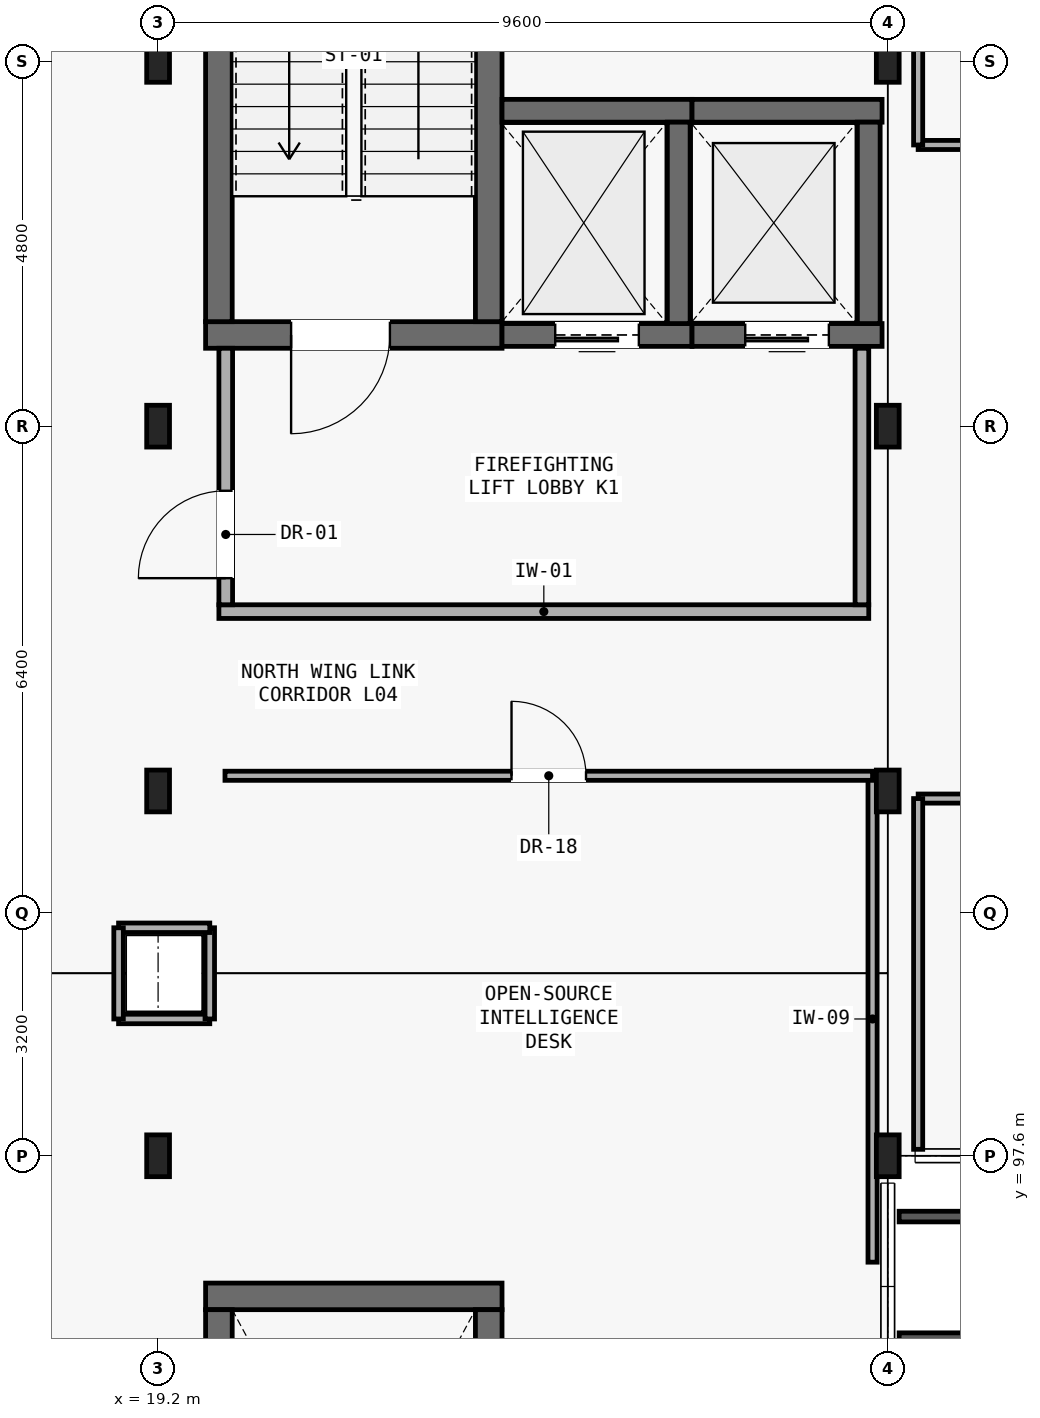
"""IFC4 building model, lengths in metres.
Left out: names, types, materials, properties, quantities, classifications, styles, units other than length and angle.
Written with IfcOpenShell. Run it as: python <this file> out.ifc"""

import sys

from ifc_helpers import new_model, si_unit, direction, frame, frame_2d, origin, origin_2d, place, context, subcontext, project, spatial, rectangle, i_section, extrude, element, fill, save


model = new_model("IFC4")
c1 = context("Model", 3, precision=1e-05, world=origin(), true_north=direction((0.0, 1.0)))
c2 = subcontext(c1, "Body", "Model", "MODEL_VIEW")
j1 = project(units=[si_unit("LENGTHUNIT", "METRE"), si_unit("PLANEANGLEUNIT", "RADIAN")], contexts=[c1])
p1 = place(None, origin())
s1 = spatial("IfcSite", under=j1, at=p1, CompositionType="ELEMENT")
p2 = place(p1, origin())
s2 = spatial("IfcBuilding", under=s1, at=p2, CompositionType="ELEMENT")
p3 = place(p2, frame((0.0, 0.0, 17.85)))
s3 = spatial("IfcBuildingStorey", under=s2, at=p3, CompositionType="ELEMENT", Elevation=17.85)
for number, where, z_axis, x_axis in (
    (1, (28.8, 97.6, 0.0), (0.0, 0.0, 1.0), (1.0, 0.0, 0.0)),
    (2, (28.8, 102.4, 0.0), (0.0, 0.0, 1.0), (1.0, 0.0, 0.0)),
    (3, (28.8, 107.2, 0.0), (0.0, 0.0, 1.0), (1.0, 0.0, 0.0)),
    (4, (28.8, 112.0, 0.0), (0.0, 0.0, 1.0), (1.0, 0.0, 0.0)),
    (5, (19.2, 97.6, 0.0), (0.0, 0.0, 1.0), (1.0, 0.0, 0.0)),
    (6, (19.2, 102.4, 0.0), (0.0, 0.0, 1.0), (1.0, 0.0, 0.0)),
    (7, (19.2, 107.2, 0.0), (0.0, 0.0, 1.0), (1.0, 0.0, 0.0)),
    (8, (19.2, 112.0, 0.0), (0.0, 0.0, 1.0), (1.0, 0.0, 0.0)),
):
    element("IfcColumn", number, at=place(p3, frame(where, z_axis=z_axis, x_axis=x_axis)), inside=s3, PredefinedType="COLUMN", context=c2, shape_type="SweptSolid", body=[
        extrude(i_section(OverallWidth=0.3, OverallDepth=0.55, WebThickness=0.015, FlangeThickness=0.029, FilletRadius=0.027, at=origin_2d()), origin(), (0.0, 0.0, 1.0), 4.2),
    ])
p4 = place(p3, frame((19.825, 108.4, 0.0), z_axis=(0.0, 0.0, 1.0), x_axis=(1.0, 0.0, 0.0)))
e9 = element("IfcWall", 9, at=p4, inside=s3, PredefinedType="SHEAR", context=c2, shape_type="SweptSolid", body=[
    extrude(rectangle(XDim=3.9, YDim=0.35, at=frame_2d((1.95, 0.0))), origin(), (0.0, 0.0, 1.0), 3.99),
])
p5 = place(p4, frame((1.125, 0.0, 0.0)))
e10 = element("IfcOpeningElement", 10, at=p5, cuts=e9, PredefinedType="OPENING", context=c2, shape_type="SweptSolid", body=[
    extrude(rectangle(XDim=1.3, YDim=2.15, at=frame_2d((0.65, 1.075))), frame((0.0, 0.185, 0.0), z_axis=(0.0, -1.0, 0.0), x_axis=(1.0, 0.0, 0.0)), (0.0, 0.0, 1.0), 0.37),
])
for number, where, z_axis, x_axis in (
    (11, (20.0, 108.575, 0.0), (0.0, 0.0, 1.0), (0.0, 1.0, 0.0)),
    (12, (23.55, 108.575, 0.0), (0.0, 0.0, 1.0), (0.0, 1.0, 0.0)),
):
    element("IfcWall", number, at=place(p3, frame(where, z_axis=z_axis, x_axis=x_axis)), inside=s3, PredefinedType="SHEAR", context=c2, shape_type="SweptSolid", body=[
        extrude(rectangle(XDim=7.6, YDim=0.35, at=frame_2d((3.8, 0.0))), origin(), (0.0, 0.0, 1.0), 3.99),
    ])
p6 = place(p3, frame((23.725, 108.4, 0.0), z_axis=(0.0, 0.0, 1.0), x_axis=(1.0, 0.0, 0.0)))
e13 = element("IfcWall", 13, at=p6, inside=s3, PredefinedType="SHEAR", context=c2, shape_type="SweptSolid", body=[
    extrude(rectangle(XDim=2.5, YDim=0.3, at=frame_2d((1.25, 0.0))), origin(), (0.0, 0.0, 1.0), 3.99),
])
p7 = place(p6, frame((0.7, 0.0, 0.0)))
e14 = element("IfcOpeningElement", 14, at=p7, cuts=e13, PredefinedType="OPENING", context=c2, shape_type="SweptSolid", body=[
    extrude(rectangle(XDim=1.1, YDim=2.1, at=frame_2d((0.55, 1.05))), frame((0.0, 0.16, 0.0), z_axis=(0.0, -1.0, 0.0), x_axis=(1.0, 0.0, 0.0)), (0.0, 0.0, 1.0), 0.32),
])
p8 = place(p3, frame((23.725, 111.35, 0.0), z_axis=(0.0, 0.0, 1.0), x_axis=(1.0, 0.0, 0.0)))
e15 = element("IfcWall", 15, at=p8, inside=s3, PredefinedType="SHEAR", context=c2, shape_type="SweptSolid", body=[
    extrude(rectangle(XDim=2.5, YDim=0.3, at=frame_2d((1.25, 0.0))), origin(), (0.0, 0.0, 1.0), 3.99),
])
p9 = place(p3, frame((26.05, 108.55, 0.0), z_axis=(0.0, 0.0, 1.0), x_axis=(0.0, 1.0, 0.0)))
e16 = element("IfcWall", 16, at=p9, inside=s3, PredefinedType="SHEAR", context=c2, shape_type="SweptSolid", body=[
    extrude(rectangle(XDim=2.65, YDim=0.3, at=frame_2d((1.325, 0.0))), origin(), (0.0, 0.0, 1.0), 3.99),
])
p10 = place(p3, frame((26.225, 108.4, 0.0), z_axis=(0.0, 0.0, 1.0), x_axis=(1.0, 0.0, 0.0)))
e17 = element("IfcWall", 17, at=p10, inside=s3, PredefinedType="SHEAR", context=c2, shape_type="SweptSolid", body=[
    extrude(rectangle(XDim=2.5, YDim=0.3, at=frame_2d((1.25, 0.0))), origin(), (0.0, 0.0, 1.0), 3.99),
])
p11 = place(p10, frame((0.7, 0.0, 0.0)))
e18 = element("IfcOpeningElement", 18, at=p11, cuts=e17, PredefinedType="OPENING", context=c2, shape_type="SweptSolid", body=[
    extrude(rectangle(XDim=1.1, YDim=2.1, at=frame_2d((0.55, 1.05))), frame((0.0, 0.16, 0.0), z_axis=(0.0, -1.0, 0.0), x_axis=(1.0, 0.0, 0.0)), (0.0, 0.0, 1.0), 0.32),
])
p12 = place(p3, frame((26.225, 111.35, 0.0), z_axis=(0.0, 0.0, 1.0), x_axis=(1.0, 0.0, 0.0)))
e19 = element("IfcWall", 19, at=p12, inside=s3, PredefinedType="SHEAR", context=c2, shape_type="SweptSolid", body=[
    extrude(rectangle(XDim=2.5, YDim=0.3, at=frame_2d((1.25, 0.0))), origin(), (0.0, 0.0, 1.0), 3.99),
])
p13 = place(p3, frame((28.55, 108.55, 0.0), z_axis=(0.0, 0.0, 1.0), x_axis=(0.0, 1.0, 0.0)))
e20 = element("IfcWall", 20, at=p13, inside=s3, PredefinedType="SHEAR", context=c2, shape_type="SweptSolid", body=[
    extrude(rectangle(XDim=2.65, YDim=0.3, at=frame_2d((1.325, 0.0))), origin(), (0.0, 0.0, 1.0), 3.99),
])
p14 = place(p3, frame((20.0, 104.76, 0.0), z_axis=(0.0, 0.0, 1.0), x_axis=(1.0, 0.0, 0.0)))
e21 = element("IfcWall", 21, at=p14, inside=s3, PredefinedType="PARTITIONING", context=c2, shape_type="SweptSolid", body=[
    extrude(rectangle(XDim=8.55, YDim=0.18, at=frame_2d((4.275, 0.0))), origin(), (0.0, 0.0, 1.0), 3.47),
])
p15 = place(p3, frame((20.09, 104.85, 0.0), z_axis=(0.0, 0.0, 1.0), x_axis=(0.0, 1.0, 0.0)))
e22 = element("IfcWall", 22, at=p15, inside=s3, PredefinedType="PARTITIONING", context=c2, shape_type="SweptSolid", body=[
    extrude(rectangle(XDim=3.375, YDim=0.18, at=frame_2d((1.688, 0.0))), origin(), (0.0, 0.0, 1.0), 3.99),
])
p16 = place(p15, frame((0.35, 0.0, 0.0)))
e23 = element("IfcOpeningElement", 23, at=p16, cuts=e22, PredefinedType="OPENING", context=c2, shape_type="SweptSolid", body=[
    extrude(rectangle(XDim=1.15, YDim=2.15, at=frame_2d((0.575, 1.075))), frame((0.0, 0.1, 0.0), z_axis=(0.0, -1.0, 0.0), x_axis=(1.0, 0.0, 0.0)), (0.0, 0.0, 1.0), 0.2),
])
p17 = place(p3, frame((28.46, 104.85, 0.0), z_axis=(0.0, 0.0, 1.0), x_axis=(0.0, 1.0, 0.0)))
e24 = element("IfcWall", 24, at=p17, inside=s3, PredefinedType="PARTITIONING", context=c2, shape_type="SweptSolid", body=[
    extrude(rectangle(XDim=3.375, YDim=0.18, at=frame_2d((1.688, 0.0))), origin(), (0.0, 0.0, 1.0), 3.99),
])
p18 = place(p3, frame((19.825, 95.75, 0.0), z_axis=(0.0, 0.0, 1.0), x_axis=(1.0, 0.0, 0.0)))
e25 = element("IfcWall", 25, at=p18, inside=s3, PredefinedType="SHEAR", context=c2, shape_type="SweptSolid", body=[
    extrude(rectangle(XDim=3.9, YDim=0.35, at=frame_2d((1.95, 0.0))), origin(), (0.0, 0.0, 1.0), 3.99),
])
for number, where, z_axis, x_axis in (
    (26, (20.0, 87.975, 0.0), (0.0, 0.0, 1.0), (0.0, 1.0, 0.0)),
    (27, (23.55, 87.975, 0.0), (0.0, 0.0, 1.0), (0.0, 1.0, 0.0)),
):
    element("IfcWall", number, at=place(p3, frame(where, z_axis=z_axis, x_axis=x_axis)), inside=s3, PredefinedType="SHEAR", context=c2, shape_type="SweptSolid", body=[
        extrude(rectangle(XDim=7.6, YDim=0.35, at=frame_2d((3.8, 0.0))), origin(), (0.0, 0.0, 1.0), 3.99),
    ])
p19 = place(p3, frame((18.68, 99.4, 0.0), z_axis=(0.0, 0.0, 1.0), x_axis=(1.0, 0.0, 0.0)))
e28 = element("IfcWall", 28, at=p19, inside=s3, PredefinedType="PARTITIONING", context=c2, shape_type="SweptSolid", body=[
    extrude(rectangle(XDim=1.2, YDim=0.125, at=frame_2d((0.6, 0.0))), origin(), (0.0, 0.0, 1.0), 3.99),
])
p20 = place(p3, frame((19.88, 99.4, 0.0), z_axis=(0.0, 0.0, 1.0), x_axis=(0.0, 1.0, 0.0)))
e29 = element("IfcWall", 29, at=p20, inside=s3, PredefinedType="PARTITIONING", context=c2, shape_type="SweptSolid", body=[
    extrude(rectangle(XDim=1.2, YDim=0.125, at=frame_2d((0.6, 0.0))), origin(), (0.0, 0.0, 1.0), 3.99),
])
p21 = place(p3, frame((19.88, 100.6, 0.0), z_axis=(0.0, 0.0, 1.0), x_axis=(-1.0, 0.0, 0.0)))
e30 = element("IfcWall", 30, at=p21, inside=s3, PredefinedType="PARTITIONING", context=c2, shape_type="SweptSolid", body=[
    extrude(rectangle(XDim=1.2, YDim=0.125, at=frame_2d((0.6, 0.0))), origin(), (0.0, 0.0, 1.0), 3.99),
])
p22 = place(p3, frame((18.68, 100.6, 0.0), z_axis=(0.0, 0.0, 1.0), x_axis=(0.0, -1.0, 0.0)))
e31 = element("IfcWall", 31, at=p22, inside=s3, PredefinedType="PARTITIONING", context=c2, shape_type="SweptSolid", body=[
    extrude(rectangle(XDim=1.2, YDim=0.125, at=frame_2d((0.6, 0.0))), origin(), (0.0, 0.0, 1.0), 3.99),
])
p23 = place(p3, frame((28.6, 96.2, 0.0), z_axis=(0.0, 0.0, 1.0), x_axis=(0.0, 1.0, 0.0)))
e32 = element("IfcWall", 32, at=p23, inside=s3, PredefinedType="PARTITIONING", context=c2, shape_type="SweptSolid", body=[
    extrude(rectangle(XDim=6.4, YDim=0.12, at=frame_2d((3.2, 0.0))), origin(), (0.0, 0.0, 1.0), 3.425),
])
p24 = place(p3, frame((28.6, 102.6, 0.0), z_axis=(0.0, 0.0, 1.0), x_axis=(-1.0, 0.0, 0.0)))
e33 = element("IfcWall", 33, at=p24, inside=s3, PredefinedType="PARTITIONING", context=c2, shape_type="SweptSolid", body=[
    extrude(rectangle(XDim=8.52, YDim=0.12, at=frame_2d((4.26, 0.0))), origin(), (0.0, 0.0, 1.0), 3.165),
])
p25 = place(p24, frame((3.77, 0.0, 0.0)))
e34 = element("IfcOpeningElement", 34, at=p25, cuts=e33, PredefinedType="OPENING", context=c2, shape_type="SweptSolid", body=[
    extrude(rectangle(XDim=0.98, YDim=2.1, at=frame_2d((0.49, 1.05))), frame((0.0, 0.07, 0.0), z_axis=(0.0, -1.0, 0.0), x_axis=(1.0, 0.0, 0.0)), (0.0, 0.0, 1.0), 0.14),
])
p26 = place(p3, frame((29.2, 110.9, 0.0), z_axis=(0.0, 0.0, 1.0), x_axis=(1.0, 0.0, 0.0)))
e35 = element("IfcWall", 35, at=p26, inside=s3, PredefinedType="PARTITIONING", context=c2, shape_type="SweptSolid", body=[
    extrude(rectangle(XDim=28.4, YDim=0.12, at=frame_2d((14.2, 0.0))), origin(), (0.0, 0.0, 1.0), 3.99),
])
p27 = place(p26, frame((13.69, 0.0, 0.0)))
e36 = element("IfcOpeningElement", 36, at=p27, cuts=e35, PredefinedType="OPENING", context=c2, shape_type="SweptSolid", body=[
    extrude(rectangle(XDim=1.02, YDim=2.1, at=frame_2d((0.51, 1.05))), frame((0.0, 0.07, 0.0), z_axis=(0.0, -1.0, 0.0), x_axis=(1.0, 0.0, 0.0)), (0.0, 0.0, 1.0), 0.14),
])
p28 = place(p3, frame((29.2, 116.55, 0.0), z_axis=(0.0, 0.0, 1.0), x_axis=(0.0, -1.0, 0.0)))
e37 = element("IfcWall", 37, at=p28, inside=s3, PredefinedType="PARTITIONING", context=c2, shape_type="SweptSolid", body=[
    extrude(rectangle(XDim=5.65, YDim=0.12, at=frame_2d((2.825, 0.0))), origin(), (0.0, 0.0, 1.0), 3.99),
])
p29 = place(p3, frame((57.6, 102.3, 0.0), z_axis=(0.0, 0.0, 1.0), x_axis=(-1.0, 0.0, 0.0)))
e38 = element("IfcWall", 38, at=p29, inside=s3, PredefinedType="PARTITIONING", context=c2, shape_type="SweptSolid", body=[
    extrude(rectangle(XDim=28.4, YDim=0.12, at=frame_2d((14.2, 0.0))), origin(), (0.0, 0.0, 1.0), 3.99),
])
p30 = place(p29, frame((13.69, 0.0, 0.0)))
e39 = element("IfcOpeningElement", 39, at=p30, cuts=e38, PredefinedType="OPENING", context=c2, shape_type="SweptSolid", body=[
    extrude(rectangle(XDim=1.02, YDim=2.1, at=frame_2d((0.51, 1.05))), frame((0.0, 0.07, 0.0), z_axis=(0.0, -1.0, 0.0), x_axis=(1.0, 0.0, 0.0)), (0.0, 0.0, 1.0), 0.14),
])
p31 = place(p3, frame((29.2, 102.3, 0.0), z_axis=(0.0, 0.0, 1.0), x_axis=(0.0, -1.0, 0.0)))
e40 = element("IfcWall", 40, at=p31, inside=s3, PredefinedType="PARTITIONING", context=c2, shape_type="SweptSolid", body=[
    extrude(rectangle(XDim=4.615, YDim=0.12, at=frame_2d((2.308, 0.0))), origin(), (0.0, 0.0, 1.0), 3.99),
])
p32 = place(p5, frame((1.3, 0.0, 0.0), z_axis=(0.0, 0.0, 1.0), x_axis=(-1.0, 0.0, 0.0)))
e41 = element("IfcDoor", 41, at=p32, inside=s3, OperationType="SINGLE_SWING_LEFT", PredefinedType="DOOR", context=c2, shape_type="SweptSolid", body=[
    extrude(rectangle(XDim=1.3, YDim=2.15, at=frame_2d((0.65, 1.075))), frame((0.0, 0.025, 0.0), z_axis=(0.0, -1.0, 0.0), x_axis=(1.0, 0.0, 0.0)), (0.0, 0.0, 1.0), 0.05),
])
fill(e10, e41)
p33 = place(p7, frame((1.1, 0.0, 0.0), z_axis=(0.0, 0.0, 1.0), x_axis=(-1.0, 0.0, 0.0)))
e42 = element("IfcDoor", 42, at=p33, inside=s3, OperationType="SLIDING_TO_LEFT", PredefinedType="DOOR", context=c2, shape_type="SweptSolid", body=[
    extrude(rectangle(XDim=1.1, YDim=2.1, at=frame_2d((0.55, 1.05))), frame((0.0, 0.025, 0.0), z_axis=(0.0, -1.0, 0.0), x_axis=(1.0, 0.0, 0.0)), (0.0, 0.0, 1.0), 0.05),
])
fill(e14, e42)
p34 = place(p11, frame((1.1, 0.0, 0.0), z_axis=(0.0, 0.0, 1.0), x_axis=(-1.0, 0.0, 0.0)))
e43 = element("IfcDoor", 43, at=p34, inside=s3, OperationType="SLIDING_TO_LEFT", PredefinedType="DOOR", context=c2, shape_type="SweptSolid", body=[
    extrude(rectangle(XDim=1.1, YDim=2.1, at=frame_2d((0.55, 1.05))), frame((0.0, 0.025, 0.0), z_axis=(0.0, -1.0, 0.0), x_axis=(1.0, 0.0, 0.0)), (0.0, 0.0, 1.0), 0.05),
])
fill(e18, e43)
p35 = place(p16, origin())
e44 = element("IfcDoor", 44, at=p35, inside=s3, OperationType="SINGLE_SWING_LEFT", PredefinedType="DOOR", context=c2, shape_type="SweptSolid", body=[
    extrude(rectangle(XDim=1.15, YDim=2.15, at=frame_2d((0.575, 1.075))), frame((0.0, 0.025, 0.0), z_axis=(0.0, -1.0, 0.0), x_axis=(1.0, 0.0, 0.0)), (0.0, 0.0, 1.0), 0.05),
])
fill(e23, e44)
p36 = place(p25, frame((0.98, 0.0, 0.0), z_axis=(0.0, 0.0, 1.0), x_axis=(-1.0, 0.0, 0.0)))
e45 = element("IfcDoor", 45, at=p36, inside=s3, OperationType="SINGLE_SWING_RIGHT", PredefinedType="DOOR", context=c2, shape_type="SweptSolid", body=[
    extrude(rectangle(XDim=0.98, YDim=2.1, at=frame_2d((0.49, 1.05))), frame((0.0, 0.025, 0.0), z_axis=(0.0, -1.0, 0.0), x_axis=(1.0, 0.0, 0.0)), (0.0, 0.0, 1.0), 0.05),
])
fill(e34, e45)
save(model, sys.argv[1])
